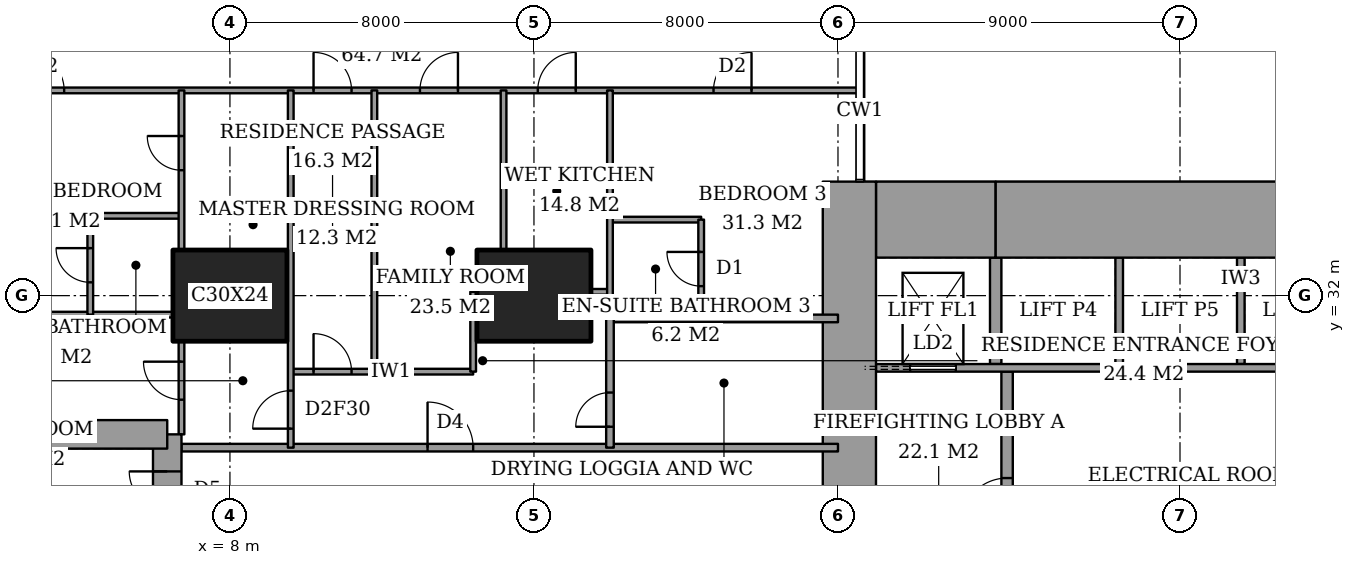
"""IFC4 building model, lengths in metres.
Left out: names, types, materials, properties, quantities, classifications, styles, units other than length and angle.
Written with IfcOpenShell. Run it as: python <this file> out.ifc"""

import sys

from ifc_helpers import new_model, si_unit, direction, frame, frame_2d, origin, origin_2d, place, context, subcontext, project, spatial, rectangle, extrude, element, fill, save


model = new_model("IFC4")
c1 = context("Model", 3, precision=1e-05, world=origin(), true_north=direction((0.0, 1.0)))
c2 = subcontext(c1, "Body", "Model", "MODEL_VIEW")
j1 = project(units=[si_unit("LENGTHUNIT", "METRE"), si_unit("PLANEANGLEUNIT", "RADIAN")], contexts=[c1])
p1 = place(None, origin())
s1 = spatial("IfcSite", under=j1, at=p1, CompositionType="ELEMENT")
p2 = place(p1, origin())
s2 = spatial("IfcBuilding", under=s1, at=p2, CompositionType="ELEMENT")
p3 = place(p2, frame((0.0, 0.0, 76.4)))
s3 = spatial("IfcBuildingStorey", under=s2, at=p3, CompositionType="ELEMENT", Elevation=76.4)
for number, where, z_axis, x_axis in (
    (1, (8.0, 32.0, 0.0), (0.0, 0.0, 1.0), (1.0, 0.0, 0.0)),
    (2, (16.0, 32.0, 0.0), (0.0, 0.0, 1.0), (1.0, 0.0, 0.0)),
):
    element("IfcColumn", number, at=place(p3, frame(where, z_axis=z_axis, x_axis=x_axis)), inside=s3, PredefinedType="COLUMN", context=c2, shape_type="SweptSolid", body=[
        extrude(rectangle(XDim=3.0, YDim=2.4, at=origin_2d()), origin(), (0.0, 0.0, 1.0), 3.6),
    ])
p4 = place(p3, frame((25.0, 34.0, 0.0), z_axis=(0.0, 0.0, 1.0), x_axis=(1.0, 0.0, 0.0)))
e3 = element("IfcWall", 3, at=p4, inside=s3, PredefinedType="SHEAR", context=c2, shape_type="SweptSolid", body=[
    extrude(rectangle(XDim=3.15, YDim=2.0, at=frame_2d((1.575, 0.0))), origin(), (0.0, 0.0, 1.0), 3.6),
])
p5 = place(p3, frame((28.15, 34.0, 0.0), z_axis=(0.0, 0.0, 1.0), x_axis=(1.0, 0.0, 0.0)))
e4 = element("IfcWall", 4, at=p5, inside=s3, PredefinedType="SHEAR", context=c2, shape_type="SweptSolid", body=[
    extrude(rectangle(XDim=9.7, YDim=2.0, at=frame_2d((4.85, 0.0))), origin(), (0.0, 0.0, 1.0), 3.6),
])
p6 = place(p3, frame((24.3, 23.15, 0.0), z_axis=(0.0, 0.0, 1.0), x_axis=(0.0, 1.0, 0.0)))
e5 = element("IfcWall", 5, at=p6, inside=s3, PredefinedType="SHEAR", context=c2, shape_type="SweptSolid", body=[
    extrude(rectangle(XDim=11.85, YDim=1.4, at=frame_2d((5.925, 0.0))), origin(), (0.0, 0.0, 1.0), 3.6),
])
p7 = place(p6, frame((0.75, 0.0, 0.0)))
e6 = element("IfcOpeningElement", 6, at=p7, cuts=e5, PredefinedType="OPENING", context=c2, shape_type="SweptSolid", body=[
    extrude(rectangle(XDim=1.8, YDim=2.4, at=frame_2d((0.9, 1.2))), frame((0.0, 0.71, 0.0), z_axis=(0.0, -1.0, 0.0), x_axis=(1.0, 0.0, 0.0)), (0.0, 0.0, 1.0), 1.42),
])
p8 = place(p3, frame((28.45, 23.3, 0.0), z_axis=(0.0, 0.0, 1.0), x_axis=(0.0, 1.0, 0.0)))
e7 = element("IfcWall", 7, at=p8, inside=s3, PredefinedType="PARTITIONING", context=c2, shape_type="SweptSolid", body=[
    extrude(rectangle(XDim=6.7, YDim=0.3, at=frame_2d((3.35, 0.0))), origin(), (0.0, 0.0, 1.0), 3.6),
])
p9 = place(p8, frame((2.7, 0.0, 0.0)))
e8 = element("IfcOpeningElement", 8, at=p9, cuts=e7, PredefinedType="OPENING", context=c2, shape_type="SweptSolid", body=[
    extrude(rectangle(XDim=1.2, YDim=2.1, at=frame_2d((0.6, 1.05))), frame((0.0, 0.16, 0.0), z_axis=(0.0, -1.0, 0.0), x_axis=(1.0, 0.0, 0.0)), (0.0, 0.0, 1.0), 0.32),
])
p10 = place(p3, frame((6.35, 19.65, 0.0), z_axis=(0.0, 0.0, 1.0), x_axis=(0.0, 1.0, 0.0)))
e9 = element("IfcWall", 9, at=p10, inside=s3, PredefinedType="SHEAR", context=c2, shape_type="SweptSolid", body=[
    extrude(rectangle(XDim=8.7, YDim=0.75, at=frame_2d((4.35, 0.0))), origin(), (0.0, 0.0, 1.0), 3.6),
])
p11 = place(p10, frame((6.725, 0.0, 0.0)))
e10 = element("IfcOpeningElement", 10, at=p11, cuts=e9, PredefinedType="OPENING", context=c2, shape_type="SweptSolid", body=[
    extrude(rectangle(XDim=1.0, YDim=2.1, at=frame_2d((0.5, 1.05))), frame((0.0, 0.385, 0.0), z_axis=(0.0, -1.0, 0.0), x_axis=(1.0, 0.0, 0.0)), (0.0, 0.0, 1.0), 0.77),
])
p12 = place(p3, frame((6.35, 28.35, 0.0), z_axis=(0.0, 0.0, 1.0), x_axis=(-1.0, 0.0, 0.0)))
e11 = element("IfcWall", 11, at=p12, inside=s3, PredefinedType="SHEAR", context=c2, shape_type="SweptSolid", body=[
    extrude(rectangle(XDim=4.45, YDim=0.75, at=frame_2d((2.225, 0.0))), origin(), (0.0, 0.0, 1.0), 3.6),
])
p13 = place(p3, frame((6.725, 28.0, 0.0), z_axis=(0.0, 0.0, 1.0), x_axis=(1.0, 0.0, 0.0)))
e12 = element("IfcWall", 12, at=p13, inside=s3, PredefinedType="PARTITIONING", context=c2, shape_type="SweptSolid", body=[
    extrude(rectangle(XDim=17.275, YDim=0.2, at=frame_2d((8.637, 0.0))), origin(), (0.0, 0.0, 1.0), 3.35),
])
p14 = place(p13, frame((6.475, 0.0, 0.0)))
e13 = element("IfcOpeningElement", 13, at=p14, cuts=e12, PredefinedType="OPENING", context=c2, shape_type="SweptSolid", body=[
    extrude(rectangle(XDim=1.2, YDim=2.4, at=frame_2d((0.6, 1.2))), frame((0.0, 0.11, 0.0), z_axis=(0.0, -1.0, 0.0), x_axis=(1.0, 0.0, 0.0)), (0.0, 0.0, 1.0), 0.22),
])
p15 = place(p3, frame((9.6, 30.0, 0.0), z_axis=(0.0, 0.0, 1.0), x_axis=(1.0, 0.0, 0.0)))
e14 = element("IfcWall", 14, at=p15, inside=s3, PredefinedType="PARTITIONING", context=c2, shape_type="SweptSolid", body=[
    extrude(rectangle(XDim=4.8, YDim=0.15, at=frame_2d((2.4, 0.0))), origin(), (0.0, 0.0, 1.0), 3.35),
])
p16 = place(p15, frame((0.6, 0.0, 0.0)))
e15 = element("IfcOpeningElement", 15, at=p16, cuts=e14, PredefinedType="OPENING", context=c2, shape_type="SweptSolid", body=[
    extrude(rectangle(XDim=1.0, YDim=2.1, at=frame_2d((0.5, 1.05))), frame((0.0, 0.085, 0.0), z_axis=(0.0, -1.0, 0.0), x_axis=(1.0, 0.0, 0.0)), (0.0, 0.0, 1.0), 0.17),
])
p17 = place(p3, frame((18.0, 31.4, 0.0), z_axis=(0.0, 0.0, 1.0), x_axis=(1.0, 0.0, 0.0)))
e16 = element("IfcWall", 16, at=p17, inside=s3, PredefinedType="PARTITIONING", context=c2, shape_type="SweptSolid", body=[
    extrude(rectangle(XDim=6.0, YDim=0.2, at=frame_2d((3.0, 0.0))), origin(), (0.0, 0.0, 1.0), 3.35),
])
p18 = place(p3, frame((1.35, 31.5, 0.0), z_axis=(0.0, 0.0, 1.0), x_axis=(1.0, 0.0, 0.0)))
e17 = element("IfcWall", 17, at=p18, inside=s3, PredefinedType="PARTITIONING", context=c2, shape_type="SweptSolid", body=[
    extrude(rectangle(XDim=5.15, YDim=0.15, at=frame_2d((2.575, 0.0))), origin(), (0.0, 0.0, 1.0), 3.35),
])
p19 = place(p3, frame((17.5, 32.1, 0.0), z_axis=(0.0, 0.0, 1.0), x_axis=(1.0, 0.0, 0.0)))
e18 = element("IfcWall", 18, at=p19, inside=s3, PredefinedType="PARTITIONING", context=c2, shape_type="SweptSolid", body=[
    extrude(rectangle(XDim=0.5, YDim=0.15, at=frame_2d((0.25, 0.0))), origin(), (0.0, 0.0, 1.0), 2.634),
])
p20 = place(p3, frame((18.0, 34.0, 0.0), z_axis=(0.0, 0.0, 1.0), x_axis=(1.0, 0.0, 0.0)))
e19 = element("IfcWall", 19, at=p20, inside=s3, PredefinedType="PARTITIONING", context=c2, shape_type="SweptSolid", body=[
    extrude(rectangle(XDim=2.4, YDim=0.15, at=frame_2d((1.2, 0.0))), origin(), (0.0, 0.0, 1.0), 3.35),
])
p21 = place(p3, frame((4.325, 34.1, 0.0), z_axis=(0.0, 0.0, 1.0), x_axis=(1.0, 0.0, 0.0)))
e20 = element("IfcWall", 20, at=p21, inside=s3, PredefinedType="PARTITIONING", context=c2, shape_type="SweptSolid", body=[
    extrude(rectangle(XDim=2.4, YDim=0.15, at=frame_2d((1.2, 0.0))), origin(), (0.0, 0.0, 1.0), 3.35),
])
p22 = place(p3, frame((-0.45, 37.4, 0.0), z_axis=(0.0, 0.0, 1.0), x_axis=(1.0, 0.0, 0.0)))
e21 = element("IfcWall", 21, at=p22, inside=s3, PredefinedType="PARTITIONING", context=c2, shape_type="SweptSolid", body=[
    extrude(rectangle(XDim=25.011, YDim=0.15, at=frame_2d((12.505, 0.0))), origin(), (0.0, 0.0, 1.0), 3.35),
])
p23 = place(p22, frame((10.65, 0.0, 0.0)))
e22 = element("IfcOpeningElement", 22, at=p23, cuts=e21, PredefinedType="OPENING", context=c2, shape_type="SweptSolid", body=[
    extrude(rectangle(XDim=1.0, YDim=2.1, at=frame_2d((0.5, 1.05))), frame((0.0, 0.085, 0.0), z_axis=(0.0, -1.0, 0.0), x_axis=(1.0, 0.0, 0.0)), (0.0, 0.0, 1.0), 0.17),
])
p24 = place(p22, frame((3.087, 0.0, 0.0)))
e23 = element("IfcOpeningElement", 23, at=p24, cuts=e21, PredefinedType="OPENING", context=c2, shape_type="SweptSolid", body=[
    extrude(rectangle(XDim=1.0, YDim=2.1, at=frame_2d((0.5, 1.05))), frame((0.0, 0.085, 0.0), z_axis=(0.0, -1.0, 0.0), x_axis=(1.0, 0.0, 0.0)), (0.0, 0.0, 1.0), 0.17),
])
p25 = place(p22, frame((13.45, 0.0, 0.0)))
e24 = element("IfcOpeningElement", 24, at=p25, cuts=e21, PredefinedType="OPENING", context=c2, shape_type="SweptSolid", body=[
    extrude(rectangle(XDim=1.0, YDim=2.1, at=frame_2d((0.5, 1.05))), frame((0.0, 0.085, 0.0), z_axis=(0.0, -1.0, 0.0), x_axis=(1.0, 0.0, 0.0)), (0.0, 0.0, 1.0), 0.17),
])
p26 = place(p22, frame((16.55, 0.0, 0.0)))
e25 = element("IfcOpeningElement", 25, at=p26, cuts=e21, PredefinedType="OPENING", context=c2, shape_type="SweptSolid", body=[
    extrude(rectangle(XDim=1.0, YDim=2.1, at=frame_2d((0.5, 1.05))), frame((0.0, 0.085, 0.0), z_axis=(0.0, -1.0, 0.0), x_axis=(1.0, 0.0, 0.0)), (0.0, 0.0, 1.0), 0.17),
])
p27 = place(p22, frame((21.175, 0.0, 0.0)))
e26 = element("IfcOpeningElement", 26, at=p27, cuts=e21, PredefinedType="OPENING", context=c2, shape_type="SweptSolid", body=[
    extrude(rectangle(XDim=1.0, YDim=2.1, at=frame_2d((0.5, 1.05))), frame((0.0, 0.085, 0.0), z_axis=(0.0, -1.0, 0.0), x_axis=(1.0, 0.0, 0.0)), (0.0, 0.0, 1.0), 0.17),
])
p28 = place(p3, frame((4.325, 31.5, 0.0), z_axis=(0.0, 0.0, 1.0), x_axis=(0.0, 1.0, 0.0)))
e27 = element("IfcWall", 27, at=p28, inside=s3, PredefinedType="PARTITIONING", context=c2, shape_type="SweptSolid", body=[
    extrude(rectangle(XDim=2.6, YDim=0.15, at=frame_2d((1.3, 0.0))), origin(), (0.0, 0.0, 1.0), 3.35),
])
p29 = place(p28, frame((0.85, 0.0, 0.0)))
e28 = element("IfcOpeningElement", 28, at=p29, cuts=e27, PredefinedType="OPENING", context=c2, shape_type="SweptSolid", body=[
    extrude(rectangle(XDim=0.9, YDim=2.1, at=frame_2d((0.45, 1.05))), frame((0.0, 0.085, 0.0), z_axis=(0.0, -1.0, 0.0), x_axis=(1.0, 0.0, 0.0)), (0.0, 0.0, 1.0), 0.17),
])
p30 = place(p3, frame((6.725, 28.35, 0.0), z_axis=(0.0, 0.0, 1.0), x_axis=(0.0, 1.0, 0.0)))
e29 = element("IfcWall", 29, at=p30, inside=s3, PredefinedType="PARTITIONING", context=c2, shape_type="SweptSolid", body=[
    extrude(rectangle(XDim=2.45, YDim=0.15, at=frame_2d((1.225, 0.0))), origin(), (0.0, 0.0, 1.0), 3.35),
])
p31 = place(p30, frame((0.913, 0.0, 0.0)))
e30 = element("IfcOpeningElement", 30, at=p31, cuts=e29, PredefinedType="OPENING", context=c2, shape_type="SweptSolid", body=[
    extrude(rectangle(XDim=1.0, YDim=2.1, at=frame_2d((0.5, 1.05))), frame((0.0, 0.085, 0.0), z_axis=(0.0, -1.0, 0.0), x_axis=(1.0, 0.0, 0.0)), (0.0, 0.0, 1.0), 0.17),
])
p32 = place(p3, frame((6.725, 33.2, 0.0), z_axis=(0.0, 0.0, 1.0), x_axis=(0.0, 1.0, 0.0)))
e31 = element("IfcWall", 31, at=p32, inside=s3, PredefinedType="PARTITIONING", context=c2, shape_type="SweptSolid", body=[
    extrude(rectangle(XDim=4.2, YDim=0.15, at=frame_2d((2.1, 0.0))), origin(), (0.0, 0.0, 1.0), 3.35),
])
p33 = place(p32, frame((2.1, 0.0, 0.0)))
e32 = element("IfcOpeningElement", 32, at=p33, cuts=e31, PredefinedType="OPENING", context=c2, shape_type="SweptSolid", body=[
    extrude(rectangle(XDim=0.9, YDim=2.1, at=frame_2d((0.45, 1.05))), frame((0.0, 0.085, 0.0), z_axis=(0.0, -1.0, 0.0), x_axis=(1.0, 0.0, 0.0)), (0.0, 0.0, 1.0), 0.17),
])
p34 = place(p3, frame((9.6, 28.0, 0.0), z_axis=(0.0, 0.0, 1.0), x_axis=(0.0, 1.0, 0.0)))
e33 = element("IfcWall", 33, at=p34, inside=s3, PredefinedType="PARTITIONING", context=c2, shape_type="SweptSolid", body=[
    extrude(rectangle(XDim=9.4, YDim=0.15, at=frame_2d((4.7, 0.0))), origin(), (0.0, 0.0, 1.0), 3.35),
])
p35 = place(p34, frame((0.5, 0.0, 0.0)))
e34 = element("IfcOpeningElement", 34, at=p35, cuts=e33, PredefinedType="OPENING", context=c2, shape_type="SweptSolid", body=[
    extrude(rectangle(XDim=1.0, YDim=2.1, at=frame_2d((0.5, 1.05))), frame((0.0, 0.085, 0.0), z_axis=(0.0, -1.0, 0.0), x_axis=(1.0, 0.0, 0.0)), (0.0, 0.0, 1.0), 0.17),
])
p36 = place(p3, frame((11.8, 30.0, 0.0), z_axis=(0.0, 0.0, 1.0), x_axis=(0.0, 1.0, 0.0)))
e35 = element("IfcWall", 35, at=p36, inside=s3, PredefinedType="PARTITIONING", context=c2, shape_type="SweptSolid", body=[
    extrude(rectangle(XDim=7.4, YDim=0.15, at=frame_2d((3.7, 0.0))), origin(), (0.0, 0.0, 1.0), 3.35),
])
p37 = place(p3, frame((14.4, 30.0, 0.0), z_axis=(0.0, 0.0, 1.0), x_axis=(0.0, 1.0, 0.0)))
e36 = element("IfcWall", 36, at=p37, inside=s3, PredefinedType="PARTITIONING", context=c2, shape_type="SweptSolid", body=[
    extrude(rectangle(XDim=2.1, YDim=0.15, at=frame_2d((1.05, 0.0))), origin(), (0.0, 0.0, 1.0), 3.35),
])
p38 = place(p3, frame((15.2, 33.2, 0.0), z_axis=(0.0, 0.0, 1.0), x_axis=(0.0, 1.0, 0.0)))
e37 = element("IfcWall", 37, at=p38, inside=s3, PredefinedType="PARTITIONING", context=c2, shape_type="SweptSolid", body=[
    extrude(rectangle(XDim=4.2, YDim=0.15, at=frame_2d((2.1, 0.0))), origin(), (0.0, 0.0, 1.0), 3.35),
])
p39 = place(p3, frame((18.0, 28.0, 0.0), z_axis=(0.0, 0.0, 1.0), x_axis=(0.0, 1.0, 0.0)))
e38 = element("IfcWall", 38, at=p39, inside=s3, PredefinedType="PARTITIONING", context=c2, shape_type="SweptSolid", body=[
    extrude(rectangle(XDim=3.4, YDim=0.2, at=frame_2d((1.7, 0.0))), origin(), (0.0, 0.0, 1.0), 3.35),
])
p40 = place(p39, frame((0.55, 0.0, 0.0)))
e39 = element("IfcOpeningElement", 39, at=p40, cuts=e38, PredefinedType="OPENING", context=c2, shape_type="SweptSolid", body=[
    extrude(rectangle(XDim=0.9, YDim=2.1, at=frame_2d((0.45, 1.05))), frame((0.0, 0.11, 0.0), z_axis=(0.0, -1.0, 0.0), x_axis=(1.0, 0.0, 0.0)), (0.0, 0.0, 1.0), 0.22),
])
p41 = place(p3, frame((18.0, 31.4, 0.0), z_axis=(0.0, 0.0, 1.0), x_axis=(0.0, 1.0, 0.0)))
e40 = element("IfcWall", 40, at=p41, inside=s3, PredefinedType="PARTITIONING", context=c2, shape_type="SweptSolid", body=[
    extrude(rectangle(XDim=6.0, YDim=0.15, at=frame_2d((3.0, 0.0))), origin(), (0.0, 0.0, 1.0), 3.35),
])
p42 = place(p3, frame((20.4, 31.4, 0.0), z_axis=(0.0, 0.0, 1.0), x_axis=(0.0, 1.0, 0.0)))
e41 = element("IfcWall", 41, at=p42, inside=s3, PredefinedType="PARTITIONING", context=c2, shape_type="SweptSolid", body=[
    extrude(rectangle(XDim=2.6, YDim=0.15, at=frame_2d((1.3, 0.0))), origin(), (0.0, 0.0, 1.0), 3.35),
])
p43 = place(p42, frame((0.85, 0.0, 0.0)))
e42 = element("IfcOpeningElement", 42, at=p43, cuts=e41, PredefinedType="OPENING", context=c2, shape_type="SweptSolid", body=[
    extrude(rectangle(XDim=0.9, YDim=2.1, at=frame_2d((0.45, 1.05))), frame((0.0, 0.085, 0.0), z_axis=(0.0, -1.0, 0.0), x_axis=(1.0, 0.0, 0.0)), (0.0, 0.0, 1.0), 0.17),
])
p44 = place(p3, frame((25.0, 30.1, 0.0), z_axis=(0.0, 0.0, 1.0), x_axis=(1.0, 0.0, 0.0)))
e43 = element("IfcWall", 43, at=p44, inside=s3, PredefinedType="PARTITIONING", context=c2, shape_type="SweptSolid", body=[
    extrude(rectangle(XDim=12.7, YDim=0.2, at=frame_2d((6.35, 0.0))), origin(), (0.0, 0.0, 1.0), 3.6),
])
p45 = place(p44, frame((0.9, 0.0, 0.0)))
e44 = element("IfcOpeningElement", 44, at=p45, cuts=e43, PredefinedType="OPENING", context=c2, shape_type="SweptSolid", body=[
    extrude(rectangle(XDim=1.2, YDim=2.1, at=frame_2d((0.6, 1.05))), frame((0.0, 0.11, 0.0), z_axis=(0.0, -1.0, 0.0), x_axis=(1.0, 0.0, 0.0)), (0.0, 0.0, 1.0), 0.22),
])
for number, where, z_axis, x_axis in (
    (45, (31.4, 30.2, 0.0), (0.0, 0.0, 1.0), (0.0, 1.0, 0.0)),
    (46, (34.6, 30.2, 0.0), (0.0, 0.0, 1.0), (0.0, 1.0, 0.0)),
):
    element("IfcWall", number, at=place(p3, frame(where, z_axis=z_axis, x_axis=x_axis)), inside=s3, PredefinedType="PARTITIONING", context=c2, shape_type="SweptSolid", body=[
        extrude(rectangle(XDim=2.8, YDim=0.2, at=frame_2d((1.4, 0.0))), origin(), (0.0, 0.0, 1.0), 3.6),
    ])
p46 = place(p3, frame((28.15, 30.2, 0.0), z_axis=(0.0, 0.0, 1.0), x_axis=(0.0, 1.0, 0.0)))
e47 = element("IfcWall", 47, at=p46, inside=s3, PredefinedType="SHEAR", context=c2, shape_type="SweptSolid", body=[
    extrude(rectangle(XDim=2.8, YDim=0.3, at=frame_2d((1.4, 0.0))), origin(), (0.0, 0.0, 1.0), 3.6),
])
p47 = place(p23, origin())
e48 = element("IfcDoor", 48, at=p47, inside=s3, OperationType="SINGLE_SWING_RIGHT", PredefinedType="DOOR", context=c2, shape_type="SweptSolid", body=[
    extrude(rectangle(XDim=1.0, YDim=2.1, at=frame_2d((0.5, 1.05))), frame((0.0, 0.025, 0.0), z_axis=(0.0, -1.0, 0.0), x_axis=(1.0, 0.0, 0.0)), (0.0, 0.0, 1.0), 0.05),
])
fill(e22, e48)
p48 = place(p29, origin())
e49 = element("IfcDoor", 49, at=p48, inside=s3, OperationType="SINGLE_SWING_LEFT", PredefinedType="DOOR", context=c2, shape_type="SweptSolid", body=[
    extrude(rectangle(XDim=0.9, YDim=2.1, at=frame_2d((0.45, 1.05))), frame((0.0, 0.025, 0.0), z_axis=(0.0, -1.0, 0.0), x_axis=(1.0, 0.0, 0.0)), (0.0, 0.0, 1.0), 0.05),
])
fill(e28, e49)
p49 = place(p24, origin())
e50 = element("IfcDoor", 50, at=p49, inside=s3, OperationType="SINGLE_SWING_RIGHT", PredefinedType="DOOR", context=c2, shape_type="SweptSolid", body=[
    extrude(rectangle(XDim=1.0, YDim=2.1, at=frame_2d((0.5, 1.05))), frame((0.0, 0.025, 0.0), z_axis=(0.0, -1.0, 0.0), x_axis=(1.0, 0.0, 0.0)), (0.0, 0.0, 1.0), 0.05),
])
fill(e23, e50)
p50 = place(p31, origin())
e51 = element("IfcDoor", 51, at=p50, inside=s3, OperationType="SINGLE_SWING_LEFT", PredefinedType="DOOR", context=c2, shape_type="SweptSolid", body=[
    extrude(rectangle(XDim=1.0, YDim=2.1, at=frame_2d((0.5, 1.05))), frame((0.0, 0.025, 0.0), z_axis=(0.0, -1.0, 0.0), x_axis=(1.0, 0.0, 0.0)), (0.0, 0.0, 1.0), 0.05),
])
fill(e30, e51)
p51 = place(p33, origin())
e52 = element("IfcDoor", 52, at=p51, inside=s3, OperationType="SINGLE_SWING_LEFT", PredefinedType="DOOR", context=c2, shape_type="SweptSolid", body=[
    extrude(rectangle(XDim=0.9, YDim=2.1, at=frame_2d((0.45, 1.05))), frame((0.0, 0.025, 0.0), z_axis=(0.0, -1.0, 0.0), x_axis=(1.0, 0.0, 0.0)), (0.0, 0.0, 1.0), 0.05),
])
fill(e32, e52)
p52 = place(p35, origin())
e53 = element("IfcDoor", 53, at=p52, inside=s3, OperationType="SINGLE_SWING_RIGHT", PredefinedType="DOOR", context=c2, shape_type="SweptSolid", body=[
    extrude(rectangle(XDim=1.0, YDim=2.1, at=frame_2d((0.5, 1.05))), frame((0.0, 0.025, 0.0), z_axis=(0.0, -1.0, 0.0), x_axis=(1.0, 0.0, 0.0)), (0.0, 0.0, 1.0), 0.05),
])
fill(e34, e53)
p53 = place(p14, origin())
e54 = element("IfcDoor", 54, at=p53, inside=s3, OperationType="SINGLE_SWING_RIGHT", PredefinedType="DOOR", context=c2, shape_type="SweptSolid", body=[
    extrude(rectangle(XDim=1.2, YDim=2.4, at=frame_2d((0.6, 1.2))), frame((0.0, 0.025, 0.0), z_axis=(0.0, -1.0, 0.0), x_axis=(1.0, 0.0, 0.0)), (0.0, 0.0, 1.0), 0.05),
])
fill(e13, e54)
p54 = place(p16, origin())
e55 = element("IfcDoor", 55, at=p54, inside=s3, OperationType="SINGLE_SWING_RIGHT", PredefinedType="DOOR", context=c2, shape_type="SweptSolid", body=[
    extrude(rectangle(XDim=1.0, YDim=2.1, at=frame_2d((0.5, 1.05))), frame((0.0, 0.025, 0.0), z_axis=(0.0, -1.0, 0.0), x_axis=(1.0, 0.0, 0.0)), (0.0, 0.0, 1.0), 0.05),
])
fill(e15, e55)
p55 = place(p25, origin())
e56 = element("IfcDoor", 56, at=p55, inside=s3, OperationType="SINGLE_SWING_LEFT", PredefinedType="DOOR", context=c2, shape_type="SweptSolid", body=[
    extrude(rectangle(XDim=1.0, YDim=2.1, at=frame_2d((0.5, 1.05))), frame((0.0, 0.025, 0.0), z_axis=(0.0, -1.0, 0.0), x_axis=(1.0, 0.0, 0.0)), (0.0, 0.0, 1.0), 0.05),
])
fill(e24, e56)
p56 = place(p26, origin())
e57 = element("IfcDoor", 57, at=p56, inside=s3, OperationType="SINGLE_SWING_LEFT", PredefinedType="DOOR", context=c2, shape_type="SweptSolid", body=[
    extrude(rectangle(XDim=1.0, YDim=2.1, at=frame_2d((0.5, 1.05))), frame((0.0, 0.025, 0.0), z_axis=(0.0, -1.0, 0.0), x_axis=(1.0, 0.0, 0.0)), (0.0, 0.0, 1.0), 0.05),
])
fill(e25, e57)
p57 = place(p43, origin())
e58 = element("IfcDoor", 58, at=p57, inside=s3, OperationType="SINGLE_SWING_LEFT", PredefinedType="DOOR", context=c2, shape_type="SweptSolid", body=[
    extrude(rectangle(XDim=0.9, YDim=2.1, at=frame_2d((0.45, 1.05))), frame((0.0, 0.025, 0.0), z_axis=(0.0, -1.0, 0.0), x_axis=(1.0, 0.0, 0.0)), (0.0, 0.0, 1.0), 0.05),
])
fill(e42, e58)
p58 = place(p27, origin())
e59 = element("IfcDoor", 59, at=p58, inside=s3, OperationType="SINGLE_SWING_LEFT", PredefinedType="DOOR", context=c2, shape_type="SweptSolid", body=[
    extrude(rectangle(XDim=1.0, YDim=2.1, at=frame_2d((0.5, 1.05))), frame((0.0, 0.025, 0.0), z_axis=(0.0, -1.0, 0.0), x_axis=(1.0, 0.0, 0.0)), (0.0, 0.0, 1.0), 0.05),
])
fill(e26, e59)
p59 = place(p40, origin())
e60 = element("IfcDoor", 60, at=p59, inside=s3, OperationType="SINGLE_SWING_RIGHT", PredefinedType="DOOR", context=c2, shape_type="SweptSolid", body=[
    extrude(rectangle(XDim=0.9, YDim=2.1, at=frame_2d((0.45, 1.05))), frame((0.0, 0.025, 0.0), z_axis=(0.0, -1.0, 0.0), x_axis=(1.0, 0.0, 0.0)), (0.0, 0.0, 1.0), 0.05),
])
fill(e39, e60)
p60 = place(p9, origin())
e61 = element("IfcDoor", 61, at=p60, inside=s3, OperationType="SINGLE_SWING_RIGHT", PredefinedType="DOOR", context=c2, shape_type="SweptSolid", body=[
    extrude(rectangle(XDim=1.2, YDim=2.1, at=frame_2d((0.6, 1.05))), frame((0.0, 0.025, 0.0), z_axis=(0.0, -1.0, 0.0), x_axis=(1.0, 0.0, 0.0)), (0.0, 0.0, 1.0), 0.05),
])
fill(e8, e61)
p61 = place(p45, origin())
e62 = element("IfcDoor", 62, at=p61, inside=s3, OperationType="SLIDING_TO_LEFT", PredefinedType="DOOR", context=c2, shape_type="SweptSolid", body=[
    extrude(rectangle(XDim=1.2, YDim=2.1, at=frame_2d((0.6, 1.05))), frame((0.0, 0.025, 0.0), z_axis=(0.0, -1.0, 0.0), x_axis=(1.0, 0.0, 0.0)), (0.0, 0.0, 1.0), 0.05),
])
fill(e44, e62)
p62 = place(p11, origin())
e63 = element("IfcDoor", 63, at=p62, inside=s3, OperationType="SINGLE_SWING_LEFT", PredefinedType="DOOR", context=c2, shape_type="SweptSolid", body=[
    extrude(rectangle(XDim=1.0, YDim=2.1, at=frame_2d((0.5, 1.05))), frame((0.0, 0.025, 0.0), z_axis=(0.0, -1.0, 0.0), x_axis=(1.0, 0.0, 0.0)), (0.0, 0.0, 1.0), 0.05),
])
fill(e10, e63)
save(model, sys.argv[1])
